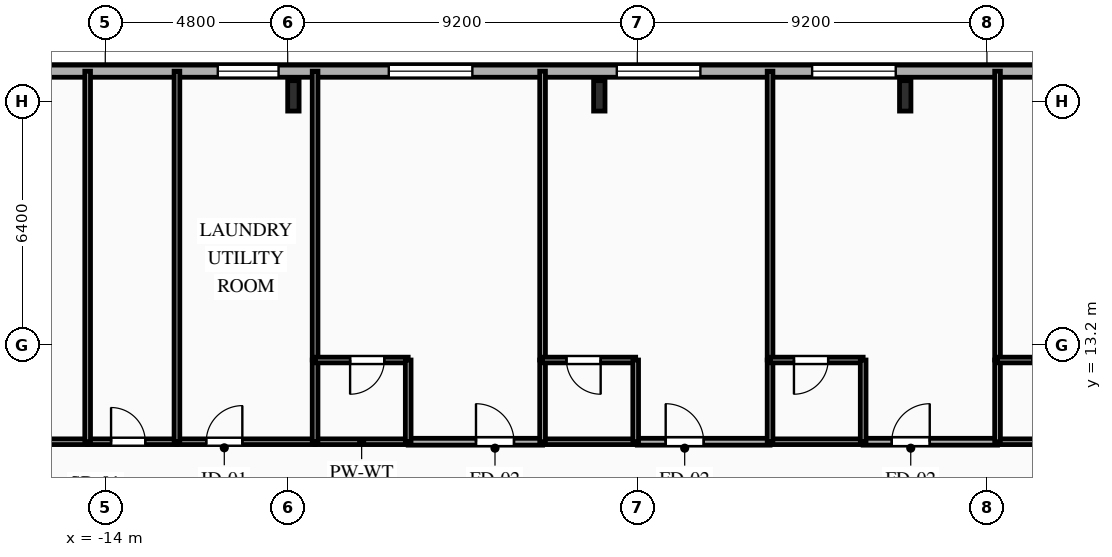
"""IFC4 building model, lengths in metres.
Left out: names, types, materials, properties, quantities, classifications, styles, units other than length and angle.
Written with IfcOpenShell. Run it as: python <this file> out.ifc"""

import sys

from ifc_helpers import new_model, si_unit, direction, frame, frame_2d, origin, origin_2d, place, context, subcontext, project, spatial, rectangle, i_section, extrude, element, fill, save


model = new_model("IFC4")
c1 = context("Model", 3, precision=1e-05, world=origin(), true_north=direction((0.0, 1.0)))
c2 = subcontext(c1, "Body", "Model", "MODEL_VIEW")
j1 = project(units=[si_unit("LENGTHUNIT", "METRE"), si_unit("PLANEANGLEUNIT", "RADIAN")], contexts=[c1])
p1 = place(None, origin())
s1 = spatial("IfcSite", under=j1, at=p1, CompositionType="ELEMENT")
p2 = place(p1, origin())
s2 = spatial("IfcBuilding", under=s1, at=p2, CompositionType="ELEMENT")
p3 = place(p2, frame((0.0, 0.0, 134.35)))
s3 = spatial("IfcBuildingStorey", under=s2, at=p3, CompositionType="ELEMENT", Elevation=134.35)
for number, where, z_axis, x_axis in (
    (1, (7.05, 19.75, 0.0), (0.0, 0.0, 1.0), (1.0, 0.0, 0.0)),
    (2, (-1.0, 19.75, 0.0), (0.0, 0.0, 1.0), (1.0, 0.0, 0.0)),
    (3, (-9.05, 19.75, 0.0), (0.0, 0.0, 1.0), (1.0, 0.0, 0.0)),
):
    element("IfcColumn", number, at=place(p3, frame(where, z_axis=z_axis, x_axis=x_axis)), inside=s3, PredefinedType="COLUMN", context=c2, shape_type="SweptSolid", body=[
        extrude(i_section(OverallWidth=0.3, OverallDepth=0.8, WebThickness=0.018, FlangeThickness=0.033, FilletRadius=0.03, at=origin_2d()), origin(), (0.0, 0.0, 1.0), 3.35),
    ])
p4 = place(p3, frame((-25.8, 20.4, 0.0), z_axis=(0.0, 0.0, 1.0), x_axis=(1.0, 0.0, 0.0)))
e4 = element("IfcWall", 4, at=p4, inside=s3, PredefinedType="SOLIDWALL", context=c2, shape_type="SweptSolid", body=[
    extrude(rectangle(XDim=49.6, YDim=0.32, at=frame_2d((24.8, 0.0))), origin(), (0.0, 0.0, 1.0), 3.04),
])
p5 = place(p4, frame((2.135, 0.0, 0.85)))
e5 = element("IfcOpeningElement", 5, at=p5, cuts=e4, PredefinedType="OPENING", context=c2, shape_type="SweptSolid", body=[
    extrude(rectangle(XDim=1.65, YDim=1.85, at=frame_2d((0.825, 0.925))), frame((0.0, 0.17, 0.0), z_axis=(0.0, -1.0, 0.0), x_axis=(1.0, 0.0, 0.0)), (0.0, 0.0, 1.0), 0.34),
])
p6 = place(p4, frame((6.706, 0.0, 0.85)))
e6 = element("IfcOpeningElement", 6, at=p6, cuts=e4, PredefinedType="OPENING", context=c2, shape_type="SweptSolid", body=[
    extrude(rectangle(XDim=1.65, YDim=1.85, at=frame_2d((0.825, 0.925))), frame((0.0, 0.17, 0.0), z_axis=(0.0, -1.0, 0.0), x_axis=(1.0, 0.0, 0.0)), (0.0, 0.0, 1.0), 0.34),
])
p7 = place(p4, frame((14.76, 0.0, 0.85)))
e7 = element("IfcOpeningElement", 7, at=p7, cuts=e4, PredefinedType="OPENING", context=c2, shape_type="SweptSolid", body=[
    extrude(rectangle(XDim=1.6, YDim=1.85, at=frame_2d((0.8, 0.925))), frame((0.0, 0.17, 0.0), z_axis=(0.0, -1.0, 0.0), x_axis=(1.0, 0.0, 0.0)), (0.0, 0.0, 1.0), 0.34),
])
p8 = place(p4, frame((19.26, 0.0, 0.85)))
e8 = element("IfcOpeningElement", 8, at=p8, cuts=e4, PredefinedType="OPENING", context=c2, shape_type="SweptSolid", body=[
    extrude(rectangle(XDim=2.2, YDim=1.85, at=frame_2d((1.1, 0.925))), frame((0.0, 0.17, 0.0), z_axis=(0.0, -1.0, 0.0), x_axis=(1.0, 0.0, 0.0)), (0.0, 0.0, 1.0), 0.34),
])
p9 = place(p4, frame((25.26, 0.0, 0.85)))
e9 = element("IfcOpeningElement", 9, at=p9, cuts=e4, PredefinedType="OPENING", context=c2, shape_type="SweptSolid", body=[
    extrude(rectangle(XDim=2.2, YDim=1.85, at=frame_2d((1.1, 0.925))), frame((0.0, 0.17, 0.0), z_axis=(0.0, -1.0, 0.0), x_axis=(1.0, 0.0, 0.0)), (0.0, 0.0, 1.0), 0.34),
])
p10 = place(p4, frame((30.4, 0.0, 0.85)))
e10 = element("IfcOpeningElement", 10, at=p10, cuts=e4, PredefinedType="OPENING", context=c2, shape_type="SweptSolid", body=[
    extrude(rectangle(XDim=2.2, YDim=1.85, at=frame_2d((1.1, 0.925))), frame((0.0, 0.17, 0.0), z_axis=(0.0, -1.0, 0.0), x_axis=(1.0, 0.0, 0.0)), (0.0, 0.0, 1.0), 0.34),
])
p11 = place(p4, frame((37.18, 0.0, 0.85)))
e11 = element("IfcOpeningElement", 11, at=p11, cuts=e4, PredefinedType="OPENING", context=c2, shape_type="SweptSolid", body=[
    extrude(rectangle(XDim=2.2, YDim=1.85, at=frame_2d((1.1, 0.925))), frame((0.0, 0.17, 0.0), z_axis=(0.0, -1.0, 0.0), x_axis=(1.0, 0.0, 0.0)), (0.0, 0.0, 1.0), 0.34),
])
p12 = place(p4, frame((43.215, 0.0, 0.85)))
e12 = element("IfcOpeningElement", 12, at=p12, cuts=e4, PredefinedType="OPENING", context=c2, shape_type="SweptSolid", body=[
    extrude(rectangle(XDim=1.65, YDim=1.85, at=frame_2d((0.825, 0.925))), frame((0.0, 0.17, 0.0), z_axis=(0.0, -1.0, 0.0), x_axis=(1.0, 0.0, 0.0)), (0.0, 0.0, 1.0), 0.34),
])
p13 = place(p4, frame((47.45, 0.0, 0.85)))
e13 = element("IfcOpeningElement", 13, at=p13, cuts=e4, PredefinedType="OPENING", context=c2, shape_type="SweptSolid", body=[
    extrude(rectangle(XDim=1.1, YDim=1.85, at=frame_2d((0.55, 0.925))), frame((0.0, 0.17, 0.0), z_axis=(0.0, -1.0, 0.0), x_axis=(1.0, 0.0, 0.0)), (0.0, 0.0, 1.0), 0.34),
])
p14 = place(p3, frame((-20.95, 10.65, 0.0), z_axis=(0.0, 0.0, 1.0), x_axis=(1.0, 0.0, 0.0)))
e14 = element("IfcWall", 14, at=p14, inside=s3, PredefinedType="PARTITIONING", context=c2, shape_type="SweptSolid", body=[
    extrude(rectangle(XDim=6.486, YDim=0.15, at=frame_2d((3.243, 0.0))), origin(), (0.0, 0.0, 1.0), 3.04),
])
p15 = place(p14, frame((4.322, 0.0, 0.0)))
e15 = element("IfcOpeningElement", 15, at=p15, cuts=e14, PredefinedType="OPENING", context=c2, shape_type="SweptSolid", body=[
    extrude(rectangle(XDim=1.05, YDim=2.15, at=frame_2d((0.525, 1.075))), frame((0.0, 0.085, 0.0), z_axis=(0.0, -1.0, 0.0), x_axis=(1.0, 0.0, 0.0)), (0.0, 0.0, 1.0), 0.17),
])
p16 = place(p3, frame((-14.464, 10.65, 0.0), z_axis=(0.0, 0.0, 1.0), x_axis=(1.0, 0.0, 0.0)))
e16 = element("IfcWall", 16, at=p16, inside=s3, PredefinedType="PLUMBINGWALL", context=c2, shape_type="SweptSolid", body=[
    extrude(rectangle(XDim=2.35, YDim=0.15, at=frame_2d((1.175, 0.0))), origin(), (0.0, 0.0, 1.0), 3.04),
])
p17 = place(p16, frame((0.616, 0.0, 0.0)))
e17 = element("IfcOpeningElement", 17, at=p17, cuts=e16, PredefinedType="OPENING", context=c2, shape_type="SweptSolid", body=[
    extrude(rectangle(XDim=0.9, YDim=2.1, at=frame_2d((0.45, 1.05))), frame((0.0, 0.085, 0.0), z_axis=(0.0, -1.0, 0.0), x_axis=(1.0, 0.0, 0.0)), (0.0, 0.0, 1.0), 0.17),
])
p18 = place(p3, frame((-12.114, 10.65, 0.0), z_axis=(0.0, 0.0, 1.0), x_axis=(1.0, 0.0, 0.0)))
e18 = element("IfcWall", 18, at=p18, inside=s3, PredefinedType="PARTITIONING", context=c2, shape_type="SweptSolid", body=[
    extrude(rectangle(XDim=3.635, YDim=0.15, at=frame_2d((1.817, 0.0))), origin(), (0.0, 0.0, 1.0), 3.04),
])
p19 = place(p18, frame((0.771, 0.0, 0.0)))
e19 = element("IfcOpeningElement", 19, at=p19, cuts=e18, PredefinedType="OPENING", context=c2, shape_type="SweptSolid", body=[
    extrude(rectangle(XDim=0.95, YDim=2.1, at=frame_2d((0.475, 1.05))), frame((0.0, 0.085, 0.0), z_axis=(0.0, -1.0, 0.0), x_axis=(1.0, 0.0, 0.0)), (0.0, 0.0, 1.0), 0.17),
])
p20 = place(p3, frame((-6.029, 10.65, 0.0), z_axis=(0.0, 0.0, 1.0), x_axis=(1.0, 0.0, 0.0)))
e20 = element("IfcWall", 20, at=p20, inside=s3, PredefinedType="PARTITIONING", context=c2, shape_type="SweptSolid", body=[
    extrude(rectangle(XDim=3.536, YDim=0.18, at=frame_2d((1.768, 0.0))), origin(), (0.0, 0.0, 1.0), 3.04),
])
p21 = place(p20, frame((1.784, 0.0, 0.0)))
e21 = element("IfcOpeningElement", 21, at=p21, cuts=e20, PredefinedType="OPENING", context=c2, shape_type="SweptSolid", body=[
    extrude(rectangle(XDim=1.0, YDim=2.15, at=frame_2d((0.5, 1.075))), frame((0.0, 0.1, 0.0), z_axis=(0.0, -1.0, 0.0), x_axis=(1.0, 0.0, 0.0)), (0.0, 0.0, 1.0), 0.2),
])
for number, where, z_axis, x_axis in (
    (22, (-8.479, 10.65, 0.0), (0.0, 0.0, 1.0), (1.0, 0.0, 0.0)),
    (23, (-2.493, 10.65, 0.0), (0.0, 0.0, 1.0), (1.0, 0.0, 0.0)),
):
    element("IfcWall", number, at=place(p3, frame(where, z_axis=z_axis, x_axis=x_axis)), inside=s3, PredefinedType="PLUMBINGWALL", context=c2, shape_type="SweptSolid", body=[
        extrude(rectangle(XDim=2.45, YDim=0.15, at=frame_2d((1.225, 0.0))), origin(), (0.0, 0.0, 1.0), 3.04),
    ])
p22 = place(p3, frame((0.0, 10.65, 0.0), z_axis=(0.0, 0.0, 1.0), x_axis=(1.0, 0.0, 0.0)))
e24 = element("IfcWall", 24, at=p22, inside=s3, PredefinedType="PARTITIONING", context=c2, shape_type="SweptSolid", body=[
    extrude(rectangle(XDim=3.493, YDim=0.18, at=frame_2d((1.747, 0.0))), origin(), (0.0, 0.0, 1.0), 3.04),
])
p23 = place(p22, frame((0.747, 0.0, 0.0)))
e25 = element("IfcOpeningElement", 25, at=p23, cuts=e24, PredefinedType="OPENING", context=c2, shape_type="SweptSolid", body=[
    extrude(rectangle(XDim=1.0, YDim=2.15, at=frame_2d((0.5, 1.075))), frame((0.0, 0.1, 0.0), z_axis=(0.0, -1.0, 0.0), x_axis=(1.0, 0.0, 0.0)), (0.0, 0.0, 1.0), 0.2),
])
p24 = place(p3, frame((5.943, 10.65, 0.0), z_axis=(0.0, 0.0, 1.0), x_axis=(1.0, 0.0, 0.0)))
e26 = element("IfcWall", 26, at=p24, inside=s3, PredefinedType="PARTITIONING", context=c2, shape_type="SweptSolid", body=[
    extrude(rectangle(XDim=3.536, YDim=0.18, at=frame_2d((1.768, 0.0))), origin(), (0.0, 0.0, 1.0), 3.04),
])
p25 = place(p24, frame((0.752, 0.0, 0.0)))
e27 = element("IfcOpeningElement", 27, at=p25, cuts=e26, PredefinedType="OPENING", context=c2, shape_type="SweptSolid", body=[
    extrude(rectangle(XDim=1.0, YDim=2.15, at=frame_2d((0.5, 1.075))), frame((0.0, 0.1, 0.0), z_axis=(0.0, -1.0, 0.0), x_axis=(1.0, 0.0, 0.0)), (0.0, 0.0, 1.0), 0.2),
])
p26 = place(p3, frame((3.493, 10.65, 0.0), z_axis=(0.0, 0.0, 1.0), x_axis=(1.0, 0.0, 0.0)))
e28 = element("IfcWall", 28, at=p26, inside=s3, PredefinedType="PLUMBINGWALL", context=c2, shape_type="SweptSolid", body=[
    extrude(rectangle(XDim=2.45, YDim=0.15, at=frame_2d((1.225, 0.0))), origin(), (0.0, 0.0, 1.0), 3.04),
])
p27 = place(p3, frame((9.479, 10.65, 0.0), z_axis=(0.0, 0.0, 1.0), x_axis=(1.0, 0.0, 0.0)))
e29 = element("IfcWall", 29, at=p27, inside=s3, PredefinedType="PLUMBINGWALL", context=c2, shape_type="SweptSolid", body=[
    extrude(rectangle(XDim=2.45, YDim=0.15, at=frame_2d((1.225, 0.0))), origin(), (0.0, 0.0, 1.0), 3.04),
])
for number, where, z_axis, x_axis in (
    (30, (-14.464, 20.4, 0.0), (0.0, 0.0, 1.0), (0.0, -1.0, 0.0)),
    (31, (-12.114, 20.4, 0.0), (0.0, 0.0, 1.0), (0.0, -1.0, 0.0)),
):
    element("IfcWall", number, at=place(p3, frame(where, z_axis=z_axis, x_axis=x_axis)), inside=s3, PredefinedType="PLUMBINGWALL", context=c2, shape_type="SweptSolid", body=[
        extrude(rectangle(XDim=9.75, YDim=0.15, at=frame_2d((4.875, 0.0))), origin(), (0.0, 0.0, 1.0), 3.04),
    ])
p28 = place(p3, frame((-8.479, 20.4, 0.0), z_axis=(0.0, 0.0, 1.0), x_axis=(0.0, -1.0, 0.0)))
e32 = element("IfcWall", 32, at=p28, inside=s3, PredefinedType="PARTITIONING", context=c2, shape_type="SweptSolid", body=[
    extrude(rectangle(XDim=7.6, YDim=0.15, at=frame_2d((3.8, 0.0))), origin(), (0.0, 0.0, 1.0), 3.04),
])
p29 = place(p3, frame((-8.479, 12.8, 0.0), z_axis=(0.0, 0.0, 1.0), x_axis=(0.0, -1.0, 0.0)))
e33 = element("IfcWall", 33, at=p29, inside=s3, PredefinedType="PLUMBINGWALL", context=c2, shape_type="SweptSolid", body=[
    extrude(rectangle(XDim=2.15, YDim=0.15, at=frame_2d((1.075, 0.0))), origin(), (0.0, 0.0, 1.0), 3.04),
])
p30 = place(p3, frame((-6.029, 12.8, 0.0), z_axis=(0.0, 0.0, 1.0), x_axis=(-1.0, 0.0, 0.0)))
e34 = element("IfcWall", 34, at=p30, inside=s3, PredefinedType="PLUMBINGWALL", context=c2, shape_type="SweptSolid", body=[
    extrude(rectangle(XDim=2.45, YDim=0.15, at=frame_2d((1.225, 0.0))), origin(), (0.0, 0.0, 1.0), 3.04),
])
p31 = place(p30, frame((0.629, 0.0, 0.0)))
e35 = element("IfcOpeningElement", 35, at=p31, cuts=e34, PredefinedType="OPENING", context=c2, shape_type="SweptSolid", body=[
    extrude(rectangle(XDim=0.9, YDim=2.1, at=frame_2d((0.45, 1.05))), frame((0.0, 0.085, 0.0), z_axis=(0.0, -1.0, 0.0), x_axis=(1.0, 0.0, 0.0)), (0.0, 0.0, 1.0), 0.17),
])
p32 = place(p3, frame((-6.029, 10.65, 0.0), z_axis=(0.0, 0.0, 1.0), x_axis=(0.0, 1.0, 0.0)))
e36 = element("IfcWall", 36, at=p32, inside=s3, PredefinedType="PLUMBINGWALL", context=c2, shape_type="SweptSolid", body=[
    extrude(rectangle(XDim=2.15, YDim=0.15, at=frame_2d((1.075, 0.0))), origin(), (0.0, 0.0, 1.0), 3.04),
])
p33 = place(p3, frame((-2.493, 20.4, 0.0), z_axis=(0.0, 0.0, 1.0), x_axis=(0.0, -1.0, 0.0)))
e37 = element("IfcWall", 37, at=p33, inside=s3, PredefinedType="PARTITIONING", context=c2, shape_type="SweptSolid", body=[
    extrude(rectangle(XDim=7.6, YDim=0.15, at=frame_2d((3.8, 0.0))), origin(), (0.0, 0.0, 1.0), 3.04),
])
p34 = place(p3, frame((-2.493, 12.8, 0.0), z_axis=(0.0, 0.0, 1.0), x_axis=(0.0, -1.0, 0.0)))
e38 = element("IfcWall", 38, at=p34, inside=s3, PredefinedType="PLUMBINGWALL", context=c2, shape_type="SweptSolid", body=[
    extrude(rectangle(XDim=2.15, YDim=0.15, at=frame_2d((1.075, 0.0))), origin(), (0.0, 0.0, 1.0), 3.04),
])
p35 = place(p3, frame((-0.043, 12.8, 0.0), z_axis=(0.0, 0.0, 1.0), x_axis=(-1.0, 0.0, 0.0)))
e39 = element("IfcWall", 39, at=p35, inside=s3, PredefinedType="PLUMBINGWALL", context=c2, shape_type="SweptSolid", body=[
    extrude(rectangle(XDim=2.45, YDim=0.15, at=frame_2d((1.225, 0.0))), origin(), (0.0, 0.0, 1.0), 3.04),
])
p36 = place(p35, frame((0.921, 0.0, 0.0)))
e40 = element("IfcOpeningElement", 40, at=p36, cuts=e39, PredefinedType="OPENING", context=c2, shape_type="SweptSolid", body=[
    extrude(rectangle(XDim=0.9, YDim=2.1, at=frame_2d((0.45, 1.05))), frame((0.0, 0.085, 0.0), z_axis=(0.0, -1.0, 0.0), x_axis=(1.0, 0.0, 0.0)), (0.0, 0.0, 1.0), 0.17),
])
p37 = place(p3, frame((-0.043, 10.65, 0.0), z_axis=(0.0, 0.0, 1.0), x_axis=(0.0, 1.0, 0.0)))
e41 = element("IfcWall", 41, at=p37, inside=s3, PredefinedType="PLUMBINGWALL", context=c2, shape_type="SweptSolid", body=[
    extrude(rectangle(XDim=2.15, YDim=0.15, at=frame_2d((1.075, 0.0))), origin(), (0.0, 0.0, 1.0), 3.04),
])
p38 = place(p3, frame((3.493, 20.4, 0.0), z_axis=(0.0, 0.0, 1.0), x_axis=(0.0, -1.0, 0.0)))
e42 = element("IfcWall", 42, at=p38, inside=s3, PredefinedType="PARTITIONING", context=c2, shape_type="SweptSolid", body=[
    extrude(rectangle(XDim=7.6, YDim=0.15, at=frame_2d((3.8, 0.0))), origin(), (0.0, 0.0, 1.0), 3.04),
])
p39 = place(p3, frame((3.493, 12.8, 0.0), z_axis=(0.0, 0.0, 1.0), x_axis=(0.0, -1.0, 0.0)))
e43 = element("IfcWall", 43, at=p39, inside=s3, PredefinedType="PLUMBINGWALL", context=c2, shape_type="SweptSolid", body=[
    extrude(rectangle(XDim=2.15, YDim=0.15, at=frame_2d((1.075, 0.0))), origin(), (0.0, 0.0, 1.0), 3.04),
])
p40 = place(p3, frame((5.943, 12.8, 0.0), z_axis=(0.0, 0.0, 1.0), x_axis=(-1.0, 0.0, 0.0)))
e44 = element("IfcWall", 44, at=p40, inside=s3, PredefinedType="PLUMBINGWALL", context=c2, shape_type="SweptSolid", body=[
    extrude(rectangle(XDim=2.45, YDim=0.15, at=frame_2d((1.225, 0.0))), origin(), (0.0, 0.0, 1.0), 3.04),
])
p41 = place(p40, frame((0.921, 0.0, 0.0)))
e45 = element("IfcOpeningElement", 45, at=p41, cuts=e44, PredefinedType="OPENING", context=c2, shape_type="SweptSolid", body=[
    extrude(rectangle(XDim=0.9, YDim=2.1, at=frame_2d((0.45, 1.05))), frame((0.0, 0.085, 0.0), z_axis=(0.0, -1.0, 0.0), x_axis=(1.0, 0.0, 0.0)), (0.0, 0.0, 1.0), 0.17),
])
p42 = place(p3, frame((5.943, 10.65, 0.0), z_axis=(0.0, 0.0, 1.0), x_axis=(0.0, 1.0, 0.0)))
e46 = element("IfcWall", 46, at=p42, inside=s3, PredefinedType="PLUMBINGWALL", context=c2, shape_type="SweptSolid", body=[
    extrude(rectangle(XDim=2.15, YDim=0.15, at=frame_2d((1.075, 0.0))), origin(), (0.0, 0.0, 1.0), 3.04),
])
p43 = place(p3, frame((9.479, 20.4, 0.0), z_axis=(0.0, 0.0, 1.0), x_axis=(0.0, -1.0, 0.0)))
e47 = element("IfcWall", 47, at=p43, inside=s3, PredefinedType="PARTITIONING", context=c2, shape_type="SweptSolid", body=[
    extrude(rectangle(XDim=7.6, YDim=0.15, at=frame_2d((3.8, 0.0))), origin(), (0.0, 0.0, 1.0), 3.04),
])
p44 = place(p3, frame((9.479, 12.8, 0.0), z_axis=(0.0, 0.0, 1.0), x_axis=(0.0, -1.0, 0.0)))
e48 = element("IfcWall", 48, at=p44, inside=s3, PredefinedType="PLUMBINGWALL", context=c2, shape_type="SweptSolid", body=[
    extrude(rectangle(XDim=2.15, YDim=0.15, at=frame_2d((1.075, 0.0))), origin(), (0.0, 0.0, 1.0), 3.04),
])
p45 = place(p3, frame((11.929, 12.8, 0.0), z_axis=(0.0, 0.0, 1.0), x_axis=(-1.0, 0.0, 0.0)))
e49 = element("IfcWall", 49, at=p45, inside=s3, PredefinedType="PLUMBINGWALL", context=c2, shape_type="SweptSolid", body=[
    extrude(rectangle(XDim=2.45, YDim=0.15, at=frame_2d((1.225, 0.0))), origin(), (0.0, 0.0, 1.0), 3.04),
])
p46 = place(p45, frame((0.629, 0.0, 0.0)))
e50 = element("IfcOpeningElement", 50, at=p46, cuts=e49, PredefinedType="OPENING", context=c2, shape_type="SweptSolid", body=[
    extrude(rectangle(XDim=0.9, YDim=2.1, at=frame_2d((0.45, 1.05))), frame((0.0, 0.085, 0.0), z_axis=(0.0, -1.0, 0.0), x_axis=(1.0, 0.0, 0.0)), (0.0, 0.0, 1.0), 0.17),
])
p47 = place(p7, origin())
e51 = element("IfcWindow", 51, at=p47, inside=s3, PartitioningType="SINGLE_PANEL", PredefinedType="WINDOW", context=c2, shape_type="SweptSolid", body=[
    extrude(rectangle(XDim=1.6, YDim=1.85, at=frame_2d((0.8, 0.925))), frame((0.0, 0.03, 0.0), z_axis=(0.0, -1.0, 0.0), x_axis=(1.0, 0.0, 0.0)), (0.0, 0.0, 1.0), 0.06),
])
fill(e7, e51)
p48 = place(p8, origin())
e52 = element("IfcWindow", 52, at=p48, inside=s3, PartitioningType="SINGLE_PANEL", PredefinedType="WINDOW", context=c2, shape_type="SweptSolid", body=[
    extrude(rectangle(XDim=2.2, YDim=1.85, at=frame_2d((1.1, 0.925))), frame((0.0, 0.03, 0.0), z_axis=(0.0, -1.0, 0.0), x_axis=(1.0, 0.0, 0.0)), (0.0, 0.0, 1.0), 0.06),
])
fill(e8, e52)
p49 = place(p9, origin())
e53 = element("IfcWindow", 53, at=p49, inside=s3, PartitioningType="SINGLE_PANEL", PredefinedType="WINDOW", context=c2, shape_type="SweptSolid", body=[
    extrude(rectangle(XDim=2.2, YDim=1.85, at=frame_2d((1.1, 0.925))), frame((0.0, 0.03, 0.0), z_axis=(0.0, -1.0, 0.0), x_axis=(1.0, 0.0, 0.0)), (0.0, 0.0, 1.0), 0.06),
])
fill(e9, e53)
p50 = place(p10, origin())
e54 = element("IfcWindow", 54, at=p50, inside=s3, PartitioningType="SINGLE_PANEL", PredefinedType="WINDOW", context=c2, shape_type="SweptSolid", body=[
    extrude(rectangle(XDim=2.2, YDim=1.85, at=frame_2d((1.1, 0.925))), frame((0.0, 0.03, 0.0), z_axis=(0.0, -1.0, 0.0), x_axis=(1.0, 0.0, 0.0)), (0.0, 0.0, 1.0), 0.06),
])
fill(e10, e54)
p51 = place(p17, origin())
e55 = element("IfcDoor", 55, at=p51, inside=s3, OperationType="SINGLE_SWING_LEFT", PredefinedType="DOOR", context=c2, shape_type="SweptSolid", body=[
    extrude(rectangle(XDim=0.9, YDim=2.1, at=frame_2d((0.45, 1.05))), frame((0.0, 0.025, 0.0), z_axis=(0.0, -1.0, 0.0), x_axis=(1.0, 0.0, 0.0)), (0.0, 0.0, 1.0), 0.05),
])
fill(e17, e55)
p52 = place(p19, origin())
e56 = element("IfcDoor", 56, at=p52, inside=s3, OperationType="SINGLE_SWING_RIGHT", PredefinedType="DOOR", context=c2, shape_type="SweptSolid", body=[
    extrude(rectangle(XDim=0.95, YDim=2.1, at=frame_2d((0.475, 1.05))), frame((0.0, 0.025, 0.0), z_axis=(0.0, -1.0, 0.0), x_axis=(1.0, 0.0, 0.0)), (0.0, 0.0, 1.0), 0.05),
])
fill(e19, e56)
p53 = place(p21, origin())
e57 = element("IfcDoor", 57, at=p53, inside=s3, OperationType="SINGLE_SWING_LEFT", PredefinedType="DOOR", context=c2, shape_type="SweptSolid", body=[
    extrude(rectangle(XDim=1.0, YDim=2.15, at=frame_2d((0.5, 1.075))), frame((0.0, 0.025, 0.0), z_axis=(0.0, -1.0, 0.0), x_axis=(1.0, 0.0, 0.0)), (0.0, 0.0, 1.0), 0.05),
])
fill(e21, e57)
p54 = place(p23, origin())
e58 = element("IfcDoor", 58, at=p54, inside=s3, OperationType="SINGLE_SWING_LEFT", PredefinedType="DOOR", context=c2, shape_type="SweptSolid", body=[
    extrude(rectangle(XDim=1.0, YDim=2.15, at=frame_2d((0.5, 1.075))), frame((0.0, 0.025, 0.0), z_axis=(0.0, -1.0, 0.0), x_axis=(1.0, 0.0, 0.0)), (0.0, 0.0, 1.0), 0.05),
])
fill(e25, e58)
p55 = place(p25, origin())
e59 = element("IfcDoor", 59, at=p55, inside=s3, OperationType="SINGLE_SWING_RIGHT", PredefinedType="DOOR", context=c2, shape_type="SweptSolid", body=[
    extrude(rectangle(XDim=1.0, YDim=2.15, at=frame_2d((0.5, 1.075))), frame((0.0, 0.025, 0.0), z_axis=(0.0, -1.0, 0.0), x_axis=(1.0, 0.0, 0.0)), (0.0, 0.0, 1.0), 0.05),
])
fill(e27, e59)
p56 = place(p31, origin())
e60 = element("IfcDoor", 60, at=p56, inside=s3, OperationType="SINGLE_SWING_RIGHT", PredefinedType="DOOR", context=c2, shape_type="SweptSolid", body=[
    extrude(rectangle(XDim=0.9, YDim=2.1, at=frame_2d((0.45, 1.05))), frame((0.0, 0.025, 0.0), z_axis=(0.0, -1.0, 0.0), x_axis=(1.0, 0.0, 0.0)), (0.0, 0.0, 1.0), 0.05),
])
fill(e35, e60)
p57 = place(p36, origin())
e61 = element("IfcDoor", 61, at=p57, inside=s3, OperationType="SINGLE_SWING_LEFT", PredefinedType="DOOR", context=c2, shape_type="SweptSolid", body=[
    extrude(rectangle(XDim=0.9, YDim=2.1, at=frame_2d((0.45, 1.05))), frame((0.0, 0.025, 0.0), z_axis=(0.0, -1.0, 0.0), x_axis=(1.0, 0.0, 0.0)), (0.0, 0.0, 1.0), 0.05),
])
fill(e40, e61)
p58 = place(p41, origin())
e62 = element("IfcDoor", 62, at=p58, inside=s3, OperationType="SINGLE_SWING_RIGHT", PredefinedType="DOOR", context=c2, shape_type="SweptSolid", body=[
    extrude(rectangle(XDim=0.9, YDim=2.1, at=frame_2d((0.45, 1.05))), frame((0.0, 0.025, 0.0), z_axis=(0.0, -1.0, 0.0), x_axis=(1.0, 0.0, 0.0)), (0.0, 0.0, 1.0), 0.05),
])
fill(e45, e62)
p59 = place(p46, origin())
e63 = element("IfcDoor", 63, at=p59, inside=s3, OperationType="SINGLE_SWING_LEFT", PredefinedType="DOOR", context=c2, shape_type="SweptSolid", body=[
    extrude(rectangle(XDim=0.9, YDim=2.1, at=frame_2d((0.45, 1.05))), frame((0.0, 0.025, 0.0), z_axis=(0.0, -1.0, 0.0), x_axis=(1.0, 0.0, 0.0)), (0.0, 0.0, 1.0), 0.05),
])
fill(e50, e63)
save(model, sys.argv[1])
